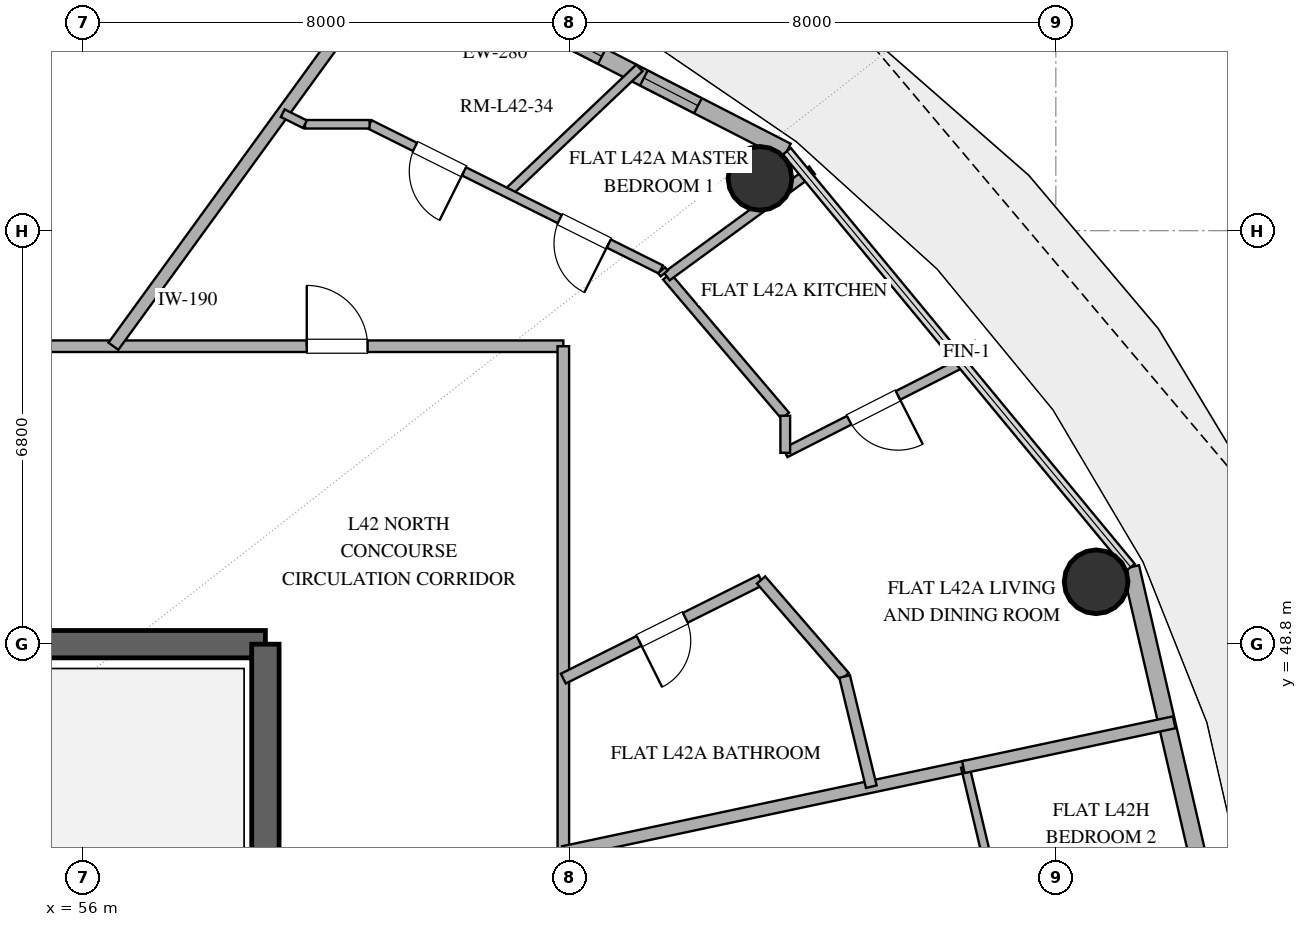
"""IFC4 building model, lengths in metres.
Left out: names, types, materials, properties, quantities, classifications, styles, units other than length and angle.
Written with IfcOpenShell. Run it as: python <this file> out.ifc"""

import sys

from ifc_helpers import new_model, si_unit, direction, frame, frame_2d, origin, origin_2d, place, context, subcontext, project, spatial, rectangle, hollow_circle, extrude, element, fill, save


model = new_model("IFC4")
c1 = context("Model", 3, precision=1e-05, world=origin(), true_north=direction((0.0, 1.0)))
c2 = subcontext(c1, "Body", "Model", "MODEL_VIEW")
j1 = project(units=[si_unit("LENGTHUNIT", "METRE"), si_unit("PLANEANGLEUNIT", "RADIAN")], contexts=[c1])
p1 = place(None, origin())
s1 = spatial("IfcSite", under=j1, at=p1, CompositionType="ELEMENT")
p2 = place(p1, origin())
s2 = spatial("IfcBuilding", under=s1, at=p2, CompositionType="ELEMENT")
p3 = place(p2, frame((0.0, 0.0, 168.6)))
s3 = spatial("IfcBuildingStorey", under=s2, at=p3, CompositionType="ELEMENT", Elevation=168.6)
p4 = place(p3, frame((55.0, 48.8, 0.0), z_axis=(0.0, 0.0, 1.0), x_axis=(1.0, 0.0, 0.0)))
e1 = element("IfcWall", 1, at=p4, inside=s3, PredefinedType="SHEAR", context=c2, shape_type="SweptSolid", body=[
    extrude(rectangle(XDim=4.0, YDim=0.45, at=frame_2d((2.0, 0.0))), origin(), (0.0, 0.0, 1.0), 3.38),
])
p5 = place(p3, frame((59.0, 35.2, 0.0), z_axis=(0.0, 0.0, 1.0), x_axis=(0.0, 1.0, 0.0)))
e2 = element("IfcWall", 2, at=p5, inside=s3, PredefinedType="SHEAR", context=c2, shape_type="SweptSolid", body=[
    extrude(rectangle(XDim=13.6, YDim=0.45, at=frame_2d((6.8, 0.0))), origin(), (0.0, 0.0, 1.0), 3.38),
])
for number, where, z_axis, x_axis in (
    (3, (72.662, 49.826, 0.0), (0.0, 0.0, 1.0), (1.0, 0.0, 0.0)),
    (4, (67.134, 56.46, 0.0), (0.0, 0.0, 1.0), (1.0, 0.0, 0.0)),
):
    element("IfcColumn", number, at=place(p3, frame(where, z_axis=z_axis, x_axis=x_axis)), inside=s3, PredefinedType="COLUMN", context=c2, shape_type="SweptSolid", body=[
        extrude(hollow_circle(Radius=0.525, WallThickness=0.028, at=origin_2d()), origin(), (0.0, 0.0, 1.0), 3.38),
    ])
p6 = place(p3, frame((75.099, 42.0, 0.0), z_axis=(0.0, 0.0, 1.0), x_axis=(-0.225473184558, 0.974249374157, 0.0)))
e5 = element("IfcWall", 5, at=p6, inside=s3, PredefinedType="SOLIDWALL", context=c2, shape_type="SweptSolid", body=[
    extrude(rectangle(XDim=8.28, YDim=0.28, at=frame_2d((4.14, 0.0))), origin(), (0.0, 0.0, 1.0), 3.38),
])
p7 = place(p6, frame((1.568, 0.0, 0.0)))
e6 = element("IfcOpeningElement", 6, at=p7, cuts=e5, PredefinedType="OPENING", context=c2, shape_type="SweptSolid", body=[
    extrude(rectangle(XDim=1.1, YDim=2.25, at=frame_2d((0.55, 1.125))), frame((0.0, 0.15, 0.0), z_axis=(0.0, -1.0, 0.0), x_axis=(1.0, 0.0, 0.0)), (0.0, 0.0, 1.0), 0.3),
])
p8 = place(p3, frame((67.576, 56.906, 0.0), z_axis=(0.0, 0.0, 1.0), x_axis=(-0.889872523182, 0.456209263919, 0.0)))
e7 = element("IfcWall", 7, at=p8, inside=s3, PredefinedType="SOLIDWALL", context=c2, shape_type="SweptSolid", body=[
    extrude(rectangle(XDim=10.016, YDim=0.28, at=frame_2d((5.008, 0.0))), origin(), (0.0, 0.0, 1.0), 3.38),
])
p9 = place(p8, frame((3.419, 0.0, 0.85)))
e8 = element("IfcOpeningElement", 8, at=p9, cuts=e7, PredefinedType="OPENING", context=c2, shape_type="SweptSolid", body=[
    extrude(rectangle(XDim=1.35, YDim=1.8, at=frame_2d((0.675, 0.9))), frame((0.0, 0.15, 0.0), z_axis=(0.0, -1.0, 0.0), x_axis=(1.0, 0.0, 0.0)), (0.0, 0.0, 1.0), 0.3),
])
p10 = place(p8, frame((5.156, 0.0, 0.85)))
e9 = element("IfcOpeningElement", 9, at=p10, cuts=e7, PredefinedType="OPENING", context=c2, shape_type="SweptSolid", body=[
    extrude(rectangle(XDim=1.35, YDim=1.8, at=frame_2d((0.675, 0.9))), frame((0.0, 0.15, 0.0), z_axis=(0.0, -1.0, 0.0), x_axis=(1.0, 0.0, 0.0)), (0.0, 0.0, 1.0), 0.3),
])
p11 = place(p8, frame((7.479, 0.0, 0.85)))
e10 = element("IfcOpeningElement", 10, at=p11, cuts=e7, PredefinedType="OPENING", context=c2, shape_type="SweptSolid", body=[
    extrude(rectangle(XDim=1.0, YDim=1.8, at=frame_2d((0.5, 0.9))), frame((0.0, 0.15, 0.0), z_axis=(0.0, -1.0, 0.0), x_axis=(1.0, 0.0, 0.0)), (0.0, 0.0, 1.0), 0.3),
])
p12 = place(p8, frame((1.643, 0.0, 0.85)))
e11 = element("IfcOpeningElement", 11, at=p12, cuts=e7, PredefinedType="OPENING", context=c2, shape_type="SweptSolid", body=[
    extrude(rectangle(XDim=1.0, YDim=1.8, at=frame_2d((0.5, 0.9))), frame((0.0, 0.15, 0.0), z_axis=(0.0, -1.0, 0.0), x_axis=(1.0, 0.0, 0.0)), (0.0, 0.0, 1.0), 0.3),
])
p13 = place(p3, frame((51.543, 53.7, 0.0), z_axis=(0.0, 0.0, 1.0), x_axis=(1.0, 0.0, 0.0)))
e12 = element("IfcWall", 12, at=p13, inside=s3, PredefinedType="PARTITIONING", context=c2, shape_type="SweptSolid", body=[
    extrude(rectangle(XDim=12.356, YDim=0.19, at=frame_2d((6.178, 0.0))), origin(), (0.0, 0.0, 1.0), 2.74),
])
p14 = place(p13, frame((8.137, 0.0, 0.0)))
e13 = element("IfcOpeningElement", 13, at=p14, cuts=e12, PredefinedType="OPENING", context=c2, shape_type="SweptSolid", body=[
    extrude(rectangle(XDim=1.0, YDim=2.2, at=frame_2d((0.5, 1.1))), frame((0.0, 0.105, 0.0), z_axis=(0.0, -1.0, 0.0), x_axis=(1.0, 0.0, 0.0)), (0.0, 0.0, 1.0), 0.21),
])
p15 = place(p13, frame((1.998, 0.0, 0.0)))
e14 = element("IfcOpeningElement", 14, at=p15, cuts=e12, PredefinedType="OPENING", context=c2, shape_type="SweptSolid", body=[
    extrude(rectangle(XDim=1.0, YDim=2.2, at=frame_2d((0.5, 1.1))), frame((0.0, 0.105, 0.0), z_axis=(0.0, -1.0, 0.0), x_axis=(1.0, 0.0, 0.0)), (0.0, 0.0, 1.0), 0.21),
])
p16 = place(p3, frame((63.9, 53.7, 0.0), z_axis=(0.0, 0.0, 1.0), x_axis=(0.0, -1.0, 0.0)))
e15 = element("IfcWall", 15, at=p16, inside=s3, PredefinedType="PARTITIONING", context=c2, shape_type="SweptSolid", body=[
    extrude(rectangle(XDim=8.32, YDim=0.19, at=frame_2d((4.16, 0.0))), origin(), (0.0, 0.0, 1.0), 2.74),
])
p17 = place(p3, frame((63.9, 45.38, 0.0), z_axis=(0.0, 0.0, 1.0), x_axis=(0.978145779981, 0.207920256603, 0.0)))
e16 = element("IfcWall", 16, at=p17, inside=s3, PredefinedType="PARTITIONING", context=c2, shape_type="SweptSolid", body=[
    extrude(rectangle(XDim=6.789, YDim=0.2, at=frame_2d((3.395, 0.0))), origin(), (0.0, 0.0, 1.0), 2.74),
])
p18 = place(p3, frame((71.649, 42.0, 0.0), z_axis=(0.0, 0.0, 1.0), x_axis=(-0.231622764326, 0.972805682059, 0.0)))
e17 = element("IfcWall", 17, at=p18, inside=s3, PredefinedType="PARTITIONING", context=c2, shape_type="SweptSolid", body=[
    extrude(rectangle(XDim=4.918, YDim=0.14, at=frame_2d((2.459, 0.0))), origin(), (0.0, 0.0, 1.0), 2.74),
])
p19 = place(p18, frame((2.009, 0.0, 0.0)))
e18 = element("IfcOpeningElement", 18, at=p19, cuts=e17, PredefinedType="OPENING", context=c2, shape_type="SweptSolid", body=[
    extrude(rectangle(XDim=0.9, YDim=2.1, at=frame_2d((0.45, 1.05))), frame((0.0, 0.08, 0.0), z_axis=(0.0, -1.0, 0.0), x_axis=(1.0, 0.0, 0.0)), (0.0, 0.0, 1.0), 0.16),
])
p20 = place(p3, frame((61.274, 60.27, 0.0), z_axis=(0.0, 0.0, 1.0), x_axis=(-0.587785528328, -0.809016793823, 0.0)))
e19 = element("IfcWall", 19, at=p20, inside=s3, PredefinedType="PARTITIONING", context=c2, shape_type="SweptSolid", body=[
    extrude(rectangle(XDim=8.121, YDim=0.2, at=frame_2d((4.061, 0.0))), origin(), (0.0, 0.0, 1.0), 2.74),
])
p21 = place(p3, frame((67.152, 49.856, 0.0), z_axis=(0.0, 0.0, 1.0), x_axis=(-0.894843352961, -0.446380301605, 0.0)))
e20 = element("IfcWall", 20, at=p21, inside=s3, PredefinedType="PLUMBINGWALL", context=c2, shape_type="SweptSolid", body=[
    extrude(rectangle(XDim=3.634, YDim=0.18, at=frame_2d((1.817, 0.0))), origin(), (0.0, 0.0, 1.0), 2.74),
])
p22 = place(p21, frame((1.392, 0.0, 0.0)))
e21 = element("IfcOpeningElement", 21, at=p22, cuts=e20, PredefinedType="OPENING", context=c2, shape_type="SweptSolid", body=[
    extrude(rectangle(XDim=0.85, YDim=2.1, at=frame_2d((0.425, 1.05))), frame((0.0, 0.1, 0.0), z_axis=(0.0, -1.0, 0.0), x_axis=(1.0, 0.0, 0.0)), (0.0, 0.0, 1.0), 0.2),
])
p23 = place(p3, frame((73.946, 47.515, 0.0), z_axis=(0.0, 0.0, 1.0), x_axis=(-0.978135742848, -0.207967469966, 0.0)))
e22 = element("IfcWall", 22, at=p23, inside=s3, PredefinedType="PARTITIONING", context=c2, shape_type="SweptSolid", body=[
    extrude(rectangle(XDim=3.545, YDim=0.2, at=frame_2d((1.773, 0.0))), origin(), (0.0, 0.0, 1.0), 2.74),
])
p24 = place(p3, frame((70.562, 53.48, 0.0), z_axis=(0.0, 0.0, 1.0), x_axis=(-0.891269321093, -0.453474362317, 0.0)))
e23 = element("IfcWall", 23, at=p24, inside=s3, PredefinedType="PLUMBINGWALL", context=c2, shape_type="SweptSolid", body=[
    extrude(rectangle(XDim=3.379, YDim=0.16, at=frame_2d((1.689, 0.0))), origin(), (0.0, 0.0, 1.0), 2.74),
])
p25 = place(p24, frame((1.3, 0.0, 0.0)))
e24 = element("IfcOpeningElement", 24, at=p25, cuts=e23, PredefinedType="OPENING", context=c2, shape_type="SweptSolid", body=[
    extrude(rectangle(XDim=0.9, YDim=2.1, at=frame_2d((0.45, 1.05))), frame((0.0, 0.09, 0.0), z_axis=(0.0, -1.0, 0.0), x_axis=(1.0, 0.0, 0.0)), (0.0, 0.0, 1.0), 0.18),
])
p26 = place(p3, frame((67.55, 52.557, 0.0), z_axis=(0.0, 0.0, 1.0), x_axis=(-0.64791931309, 0.761708975742, 0.0)))
e25 = element("IfcWall", 25, at=p26, inside=s3, PredefinedType="PLUMBINGWALL", context=c2, shape_type="SweptSolid", body=[
    extrude(rectangle(XDim=3.008, YDim=0.16, at=frame_2d((1.504, 0.0))), origin(), (0.0, 0.0, 1.0), 2.74),
])
p27 = place(p3, frame((62.983, 56.219, 0.0), z_axis=(0.0, 0.0, 1.0), x_axis=(0.725364351486, 0.688365133918, 0.0)))
e26 = element("IfcWall", 26, at=p27, inside=s3, PredefinedType="PARTITIONING", context=c2, shape_type="SweptSolid", body=[
    extrude(rectangle(XDim=2.989, YDim=0.15, at=frame_2d((1.495, 0.0))), origin(), (0.0, 0.0, 1.0), 2.74),
])
p28 = place(p3, frame((65.601, 54.848, 0.0), z_axis=(0.0, 0.0, 1.0), x_axis=(0.807696422095, 0.589598583559, 0.0)))
e27 = element("IfcWall", 27, at=p28, inside=s3, PredefinedType="PLUMBINGWALL", context=c2, shape_type="SweptSolid", body=[
    extrude(rectangle(XDim=2.958, YDim=0.16, at=frame_2d((1.479, 0.0))), origin(), (0.0, 0.0, 1.0), 2.74),
])
p29 = place(p3, frame((65.505, 54.961, 0.0), z_axis=(0.0, 0.0, 1.0), x_axis=(-0.894955531207, 0.446155350929, 0.0)))
e28 = element("IfcWall", 28, at=p29, inside=s3, PredefinedType="PARTITIONING", context=c2, shape_type="SweptSolid", body=[
    extrude(rectangle(XDim=5.354, YDim=0.15, at=frame_2d((2.677, 0.0))), origin(), (0.0, 0.0, 1.0), 2.74),
])
p30 = place(p29, frame((0.959, 0.0, 0.0)))
e29 = element("IfcOpeningElement", 29, at=p30, cuts=e28, PredefinedType="OPENING", context=c2, shape_type="SweptSolid", body=[
    extrude(rectangle(XDim=0.9, YDim=2.1, at=frame_2d((0.45, 1.05))), frame((0.0, 0.085, 0.0), z_axis=(0.0, -1.0, 0.0), x_axis=(1.0, 0.0, 0.0)), (0.0, 0.0, 1.0), 0.17),
])
p31 = place(p29, frame((3.619, 0.0, 0.0)))
e30 = element("IfcOpeningElement", 30, at=p31, cuts=e28, PredefinedType="OPENING", context=c2, shape_type="SweptSolid", body=[
    extrude(rectangle(XDim=0.9, YDim=2.1, at=frame_2d((0.45, 1.05))), frame((0.0, 0.085, 0.0), z_axis=(0.0, -1.0, 0.0), x_axis=(1.0, 0.0, 0.0)), (0.0, 0.0, 1.0), 0.17),
])
p32 = place(p3, frame((68.526, 48.268, 0.0), z_axis=(0.0, 0.0, 1.0), x_axis=(-0.654594060889, 0.755980565524, 0.0)))
e31 = element("IfcWall", 31, at=p32, inside=s3, PredefinedType="PLUMBINGWALL", context=c2, shape_type="SweptSolid", body=[
    extrude(rectangle(XDim=2.1, YDim=0.18, at=frame_2d((1.05, 0.0))), origin(), (0.0, 0.0, 1.0), 2.74),
])
p33 = place(p3, frame((68.965, 46.456, 0.0), z_axis=(0.0, 0.0, 1.0), x_axis=(-0.235442613623, 0.971888252676, 0.0)))
e32 = element("IfcWall", 32, at=p33, inside=s3, PredefinedType="PLUMBINGWALL", context=c2, shape_type="SweptSolid", body=[
    extrude(rectangle(XDim=1.865, YDim=0.18, at=frame_2d((0.932, 0.0))), origin(), (0.0, 0.0, 1.0), 2.74),
])
p34 = place(p3, frame((59.651, 57.35, 0.0), z_axis=(0.0, 0.0, 1.0), x_axis=(1.0, 0.0, 0.0)))
e33 = element("IfcWall", 33, at=p34, inside=s3, PredefinedType="PARTITIONING", context=c2, shape_type="SweptSolid", body=[
    extrude(rectangle(XDim=1.062, YDim=0.14, at=frame_2d((0.531, 0.0))), origin(), (0.0, 0.0, 1.0), 2.74),
])
p35 = place(p3, frame((67.55, 51.948, 0.0), z_axis=(0.0, 0.0, 1.0), x_axis=(0.0, 1.0, 0.0)))
e34 = element("IfcWall", 34, at=p35, inside=s3, PredefinedType="PLUMBINGWALL", context=c2, shape_type="SweptSolid", body=[
    extrude(rectangle(XDim=0.609, YDim=0.16, at=frame_2d((0.305, 0.0))), origin(), (0.0, 0.0, 1.0), 2.74),
])
p36 = place(p3, frame((59.285, 57.532, 0.0), z_axis=(0.0, 0.0, 1.0), x_axis=(0.895142158028, -0.445780794698, 0.0)))
e35 = element("IfcWall", 35, at=p36, inside=s3, PredefinedType="PARTITIONING", context=c2, shape_type="SweptSolid", body=[
    extrude(rectangle(XDim=0.409, YDim=0.14, at=frame_2d((0.205, 0.0))), origin(), (0.0, 0.0, 1.0), 2.74),
])
p37 = place(p3, frame((65.56, 54.897, 0.0), z_axis=(0.0, 0.0, 1.0), x_axis=(-0.6481623323, 0.761502193685, 0.0)))
e36 = element("IfcWall", 36, at=p37, inside=s3, PredefinedType="PARTITIONING", context=c2, shape_type="SweptSolid", body=[
    extrude(rectangle(XDim=0.069, YDim=0.15, at=frame_2d((0.034, 0.0))), origin(), (0.0, 0.0, 1.0), 2.74),
])
p38 = place(p9, origin())
e37 = element("IfcWindow", 37, at=p38, inside=s3, PartitioningType="SINGLE_PANEL", PredefinedType="WINDOW", context=c2, shape_type="SweptSolid", body=[
    extrude(rectangle(XDim=1.35, YDim=1.8, at=frame_2d((0.675, 0.9))), frame((0.0, 0.03, 0.0), z_axis=(0.0, -1.0, 0.0), x_axis=(1.0, 0.0, 0.0)), (0.0, 0.0, 1.0), 0.06),
])
fill(e8, e37)
p39 = place(p12, origin())
e38 = element("IfcWindow", 38, at=p39, inside=s3, PartitioningType="SINGLE_PANEL", PredefinedType="WINDOW", context=c2, shape_type="SweptSolid", body=[
    extrude(rectangle(XDim=1.0, YDim=1.8, at=frame_2d((0.5, 0.9))), frame((0.0, 0.03, 0.0), z_axis=(0.0, -1.0, 0.0), x_axis=(1.0, 0.0, 0.0)), (0.0, 0.0, 1.0), 0.06),
])
fill(e11, e38)
p40 = place(p14, origin())
e39 = element("IfcDoor", 39, at=p40, inside=s3, OperationType="SINGLE_SWING_LEFT", PredefinedType="DOOR", context=c2, shape_type="SweptSolid", body=[
    extrude(rectangle(XDim=1.0, YDim=2.2, at=frame_2d((0.5, 1.1))), frame((0.0, 0.025, 0.0), z_axis=(0.0, -1.0, 0.0), x_axis=(1.0, 0.0, 0.0)), (0.0, 0.0, 1.0), 0.05),
])
fill(e13, e39)
p41 = place(p22, origin())
e40 = element("IfcDoor", 40, at=p41, inside=s3, OperationType="SINGLE_SWING_RIGHT", PredefinedType="DOOR", context=c2, shape_type="SweptSolid", body=[
    extrude(rectangle(XDim=0.85, YDim=2.1, at=frame_2d((0.425, 1.05))), frame((0.0, 0.025, 0.0), z_axis=(0.0, -1.0, 0.0), x_axis=(1.0, 0.0, 0.0)), (0.0, 0.0, 1.0), 0.05),
])
fill(e21, e40)
p42 = place(p25, origin())
e41 = element("IfcDoor", 41, at=p42, inside=s3, OperationType="SINGLE_SWING_LEFT", PredefinedType="DOOR", context=c2, shape_type="SweptSolid", body=[
    extrude(rectangle(XDim=0.9, YDim=2.1, at=frame_2d((0.45, 1.05))), frame((0.0, 0.025, 0.0), z_axis=(0.0, -1.0, 0.0), x_axis=(1.0, 0.0, 0.0)), (0.0, 0.0, 1.0), 0.05),
])
fill(e24, e41)
p43 = place(p30, origin())
e42 = element("IfcDoor", 42, at=p43, inside=s3, OperationType="SINGLE_SWING_LEFT", PredefinedType="DOOR", context=c2, shape_type="SweptSolid", body=[
    extrude(rectangle(XDim=0.9, YDim=2.1, at=frame_2d((0.45, 1.05))), frame((0.0, 0.025, 0.0), z_axis=(0.0, -1.0, 0.0), x_axis=(1.0, 0.0, 0.0)), (0.0, 0.0, 1.0), 0.05),
])
fill(e29, e42)
p44 = place(p31, origin())
e43 = element("IfcDoor", 43, at=p44, inside=s3, OperationType="SINGLE_SWING_LEFT", PredefinedType="DOOR", context=c2, shape_type="SweptSolid", body=[
    extrude(rectangle(XDim=0.9, YDim=2.1, at=frame_2d((0.45, 1.05))), frame((0.0, 0.025, 0.0), z_axis=(0.0, -1.0, 0.0), x_axis=(1.0, 0.0, 0.0)), (0.0, 0.0, 1.0), 0.05),
])
fill(e30, e43)
save(model, sys.argv[1])
